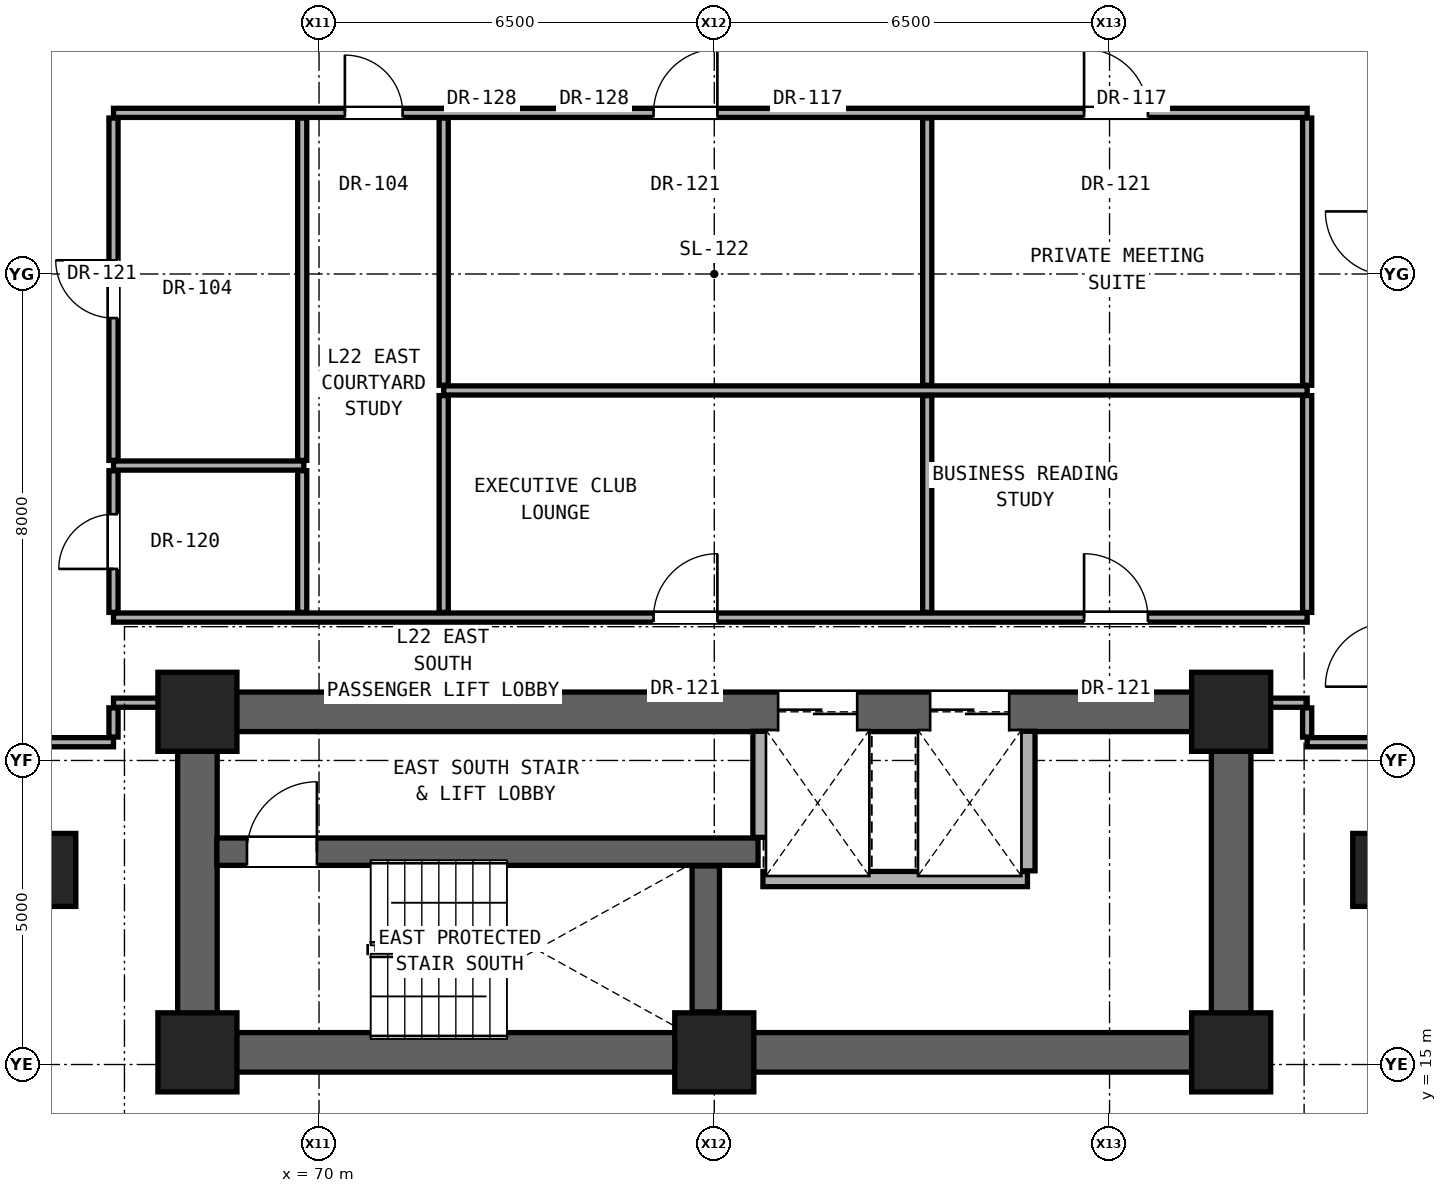
"""IFC4 building model, lengths in metres.
Left out: names, types, materials, properties, quantities, classifications, styles, units other than length and angle.
Written with IfcOpenShell. Run it as: python <this file> out.ifc"""

import sys

from ifc_helpers import new_model, si_unit, direction, frame, frame_2d, origin, origin_2d, place, context, subcontext, project, spatial, rectangle, extrude, element, fill, save


model = new_model("IFC4")
c1 = context("Model", 3, precision=1e-05, world=origin(), true_north=direction((0.0, 1.0)))
c2 = subcontext(c1, "Body", "Model", "MODEL_VIEW")
j1 = project(units=[si_unit("LENGTHUNIT", "METRE"), si_unit("PLANEANGLEUNIT", "RADIAN")], contexts=[c1])
p1 = place(None, origin())
s1 = spatial("IfcSite", under=j1, at=p1, CompositionType="ELEMENT")
p2 = place(p1, origin())
s2 = spatial("IfcBuilding", under=s1, at=p2, CompositionType="ELEMENT")
p3 = place(p2, frame((0.0, 0.0, 78.5)))
s3 = spatial("IfcBuildingStorey", under=s2, at=p3, CompositionType="ELEMENT", Elevation=78.5)
for number, where, z_axis, x_axis in (
    (1, (68.0, 15.2, 0.0), (0.0, 0.0, 1.0), (1.0, 0.0, 0.0)),
    (2, (76.5, 15.2, 0.0), (0.0, 0.0, 1.0), (1.0, 0.0, 0.0)),
    (3, (85.0, 15.2, 0.0), (0.0, 0.0, 1.0), (1.0, 0.0, 0.0)),
    (4, (68.0, 20.8, 0.0), (0.0, 0.0, 1.0), (1.0, 0.0, 0.0)),
    (5, (85.0, 20.8, 0.0), (0.0, 0.0, 1.0), (1.0, 0.0, 0.0)),
):
    element("IfcColumn", number, at=place(p3, frame(where, z_axis=z_axis, x_axis=x_axis)), inside=s3, PredefinedType="COLUMN", context=c2, shape_type="SweptSolid", body=[
        extrude(rectangle(XDim=1.3, YDim=1.3, at=origin_2d()), origin(), (0.0, 0.0, 1.0), 3.3),
    ])
for number, where, z_axis, x_axis in (
    (6, (65.6, 18.2, 0.0), (0.0, 0.0, 1.0), (1.0, 0.0, 0.0)),
    (7, (87.4, 18.2, 0.0), (0.0, 0.0, 1.0), (1.0, 0.0, 0.0)),
):
    element("IfcColumn", number, at=place(p3, frame(where, z_axis=z_axis, x_axis=x_axis)), inside=s3, PredefinedType="PILASTER", context=c2, shape_type="SweptSolid", body=[
        extrude(rectangle(XDim=0.8, YDim=1.2, at=origin_2d()), origin(), (0.0, 0.0, 1.0), 3.3),
    ])
p4 = place(p3, frame((68.0, 15.2, 0.0), z_axis=(0.0, 0.0, 1.0), x_axis=(1.0, 0.0, 0.0)))
e8 = element("IfcWall", 8, at=p4, inside=s3, PredefinedType="SHEAR", context=c2, shape_type="SweptSolid", body=[
    extrude(rectangle(XDim=17.0, YDim=0.65, at=frame_2d((8.5, 0.0))), origin(), (0.0, 0.0, 1.0), 2.94),
])
for number, where, z_axis, x_axis in (
    (9, (68.0, 15.2, 0.0), (0.0, 0.0, 1.0), (0.0, 1.0, 0.0)),
    (10, (85.0, 15.2, 0.0), (0.0, 0.0, 1.0), (0.0, 1.0, 0.0)),
):
    element("IfcWall", number, at=place(p3, frame(where, z_axis=z_axis, x_axis=x_axis)), inside=s3, PredefinedType="SHEAR", context=c2, shape_type="SweptSolid", body=[
        extrude(rectangle(XDim=5.6, YDim=0.65, at=frame_2d((2.8, 0.0))), origin(), (0.0, 0.0, 1.0), 2.94),
    ])
p5 = place(p3, frame((68.0, 20.8, 0.0), z_axis=(0.0, 0.0, 1.0), x_axis=(1.0, 0.0, 0.0)))
e11 = element("IfcWall", 11, at=p5, inside=s3, PredefinedType="SHEAR", context=c2, shape_type="SweptSolid", body=[
    extrude(rectangle(XDim=17.0, YDim=0.65, at=frame_2d((8.5, 0.0))), origin(), (0.0, 0.0, 1.0), 2.94),
])
p6 = place(p5, frame((9.55, 0.0, 0.0)))
e12 = element("IfcOpeningElement", 12, at=p6, cuts=e11, PredefinedType="OPENING", context=c2, shape_type="SweptSolid", body=[
    extrude(rectangle(XDim=1.3, YDim=2.3, at=frame_2d((0.65, 1.15))), frame((0.0, 0.335, 0.0), z_axis=(0.0, -1.0, 0.0), x_axis=(1.0, 0.0, 0.0)), (0.0, 0.0, 1.0), 0.67),
])
p7 = place(p5, frame((12.05, 0.0, 0.0)))
e13 = element("IfcOpeningElement", 13, at=p7, cuts=e11, PredefinedType="OPENING", context=c2, shape_type="SweptSolid", body=[
    extrude(rectangle(XDim=1.3, YDim=2.3, at=frame_2d((0.65, 1.15))), frame((0.0, 0.335, 0.0), z_axis=(0.0, -1.0, 0.0), x_axis=(1.0, 0.0, 0.0)), (0.0, 0.0, 1.0), 0.67),
])
p8 = place(p3, frame((77.3, 18.05, 0.0), z_axis=(0.0, 0.0, 1.0), x_axis=(1.0, 0.0, 0.0)))
e14 = element("IfcWall", 14, at=p8, inside=s3, PredefinedType="SOLIDWALL", context=c2, shape_type="SweptSolid", body=[
    extrude(rectangle(XDim=4.35, YDim=0.25, at=frame_2d((2.175, 0.0))), origin(), (0.0, 0.0, 1.0), 2.94),
])
p9 = place(p3, frame((68.32, 18.5, 0.0), z_axis=(0.0, 0.0, 1.0), x_axis=(1.0, 0.0, 0.0)))
e15 = element("IfcWall", 15, at=p9, inside=s3, PredefinedType="SHEAR", context=c2, shape_type="SweptSolid", body=[
    extrude(rectangle(XDim=8.9, YDim=0.45, at=frame_2d((4.45, 0.0))), origin(), (0.0, 0.0, 1.0), 2.94),
])
p10 = place(p9, frame((0.495, 0.0, 0.0)))
e16 = element("IfcOpeningElement", 16, at=p10, cuts=e15, PredefinedType="OPENING", context=c2, shape_type="SweptSolid", body=[
    extrude(rectangle(XDim=1.15, YDim=2.2, at=frame_2d((0.575, 1.1))), frame((0.0, 0.235, 0.0), z_axis=(0.0, -1.0, 0.0), x_axis=(1.0, 0.0, 0.0)), (0.0, 0.0, 1.0), 0.47),
])
p11 = place(p3, frame((65.25, 20.3, 0.0), z_axis=(0.0, 0.0, 1.0), x_axis=(1.0, 0.0, 0.0)))
e17 = element("IfcWall", 17, at=p11, inside=s3, PredefinedType="PARTITIONING", context=c2, shape_type="SweptSolid", body=[
    extrude(rectangle(XDim=1.37, YDim=0.15, at=frame_2d((0.685, 0.0))), origin(), (0.0, 0.0, 1.0), 2.94),
])
p12 = place(p3, frame((86.25, 20.3, 0.0), z_axis=(0.0, 0.0, 1.0), x_axis=(1.0, 0.0, 0.0)))
e18 = element("IfcWall", 18, at=p12, inside=s3, PredefinedType="PARTITIONING", context=c2, shape_type="SweptSolid", body=[
    extrude(rectangle(XDim=1.35, YDim=0.15, at=frame_2d((0.675, 0.0))), origin(), (0.0, 0.0, 1.0), 2.94),
])
p13 = place(p3, frame((66.62, 20.95, 0.0), z_axis=(0.0, 0.0, 1.0), x_axis=(1.0, 0.0, 0.0)))
e19 = element("IfcWall", 19, at=p13, inside=s3, PredefinedType="PARTITIONING", context=c2, shape_type="SweptSolid", body=[
    extrude(rectangle(XDim=1.06, YDim=0.15, at=frame_2d((0.53, 0.0))), origin(), (0.0, 0.0, 1.0), 2.332),
])
p14 = place(p3, frame((85.32, 20.95, 0.0), z_axis=(0.0, 0.0, 1.0), x_axis=(1.0, 0.0, 0.0)))
e20 = element("IfcWall", 20, at=p14, inside=s3, PredefinedType="PARTITIONING", context=c2, shape_type="SweptSolid", body=[
    extrude(rectangle(XDim=0.93, YDim=0.15, at=frame_2d((0.465, 0.0))), origin(), (0.0, 0.0, 1.0), 2.332),
])
p15 = place(p3, frame((66.62, 22.35, 0.0), z_axis=(0.0, 0.0, 1.0), x_axis=(1.0, 0.0, 0.0)))
e21 = element("IfcWall", 21, at=p15, inside=s3, PredefinedType="PARTITIONING", context=c2, shape_type="SweptSolid", body=[
    extrude(rectangle(XDim=19.63, YDim=0.15, at=frame_2d((9.815, 0.0))), origin(), (0.0, 0.0, 1.0), 2.316),
])
p16 = place(p15, frame((8.881, 0.0, 0.0)))
e22 = element("IfcOpeningElement", 22, at=p16, cuts=e21, PredefinedType="OPENING", context=c2, shape_type="SweptSolid", body=[
    extrude(rectangle(XDim=1.05, YDim=2.2, at=frame_2d((0.525, 1.1))), frame((0.0, 0.085, 0.0), z_axis=(0.0, -1.0, 0.0), x_axis=(1.0, 0.0, 0.0)), (0.0, 0.0, 1.0), 0.17),
])
p17 = place(p15, frame((15.961, 0.0, 0.0)))
e23 = element("IfcOpeningElement", 23, at=p17, cuts=e21, PredefinedType="OPENING", context=c2, shape_type="SweptSolid", body=[
    extrude(rectangle(XDim=1.05, YDim=2.2, at=frame_2d((0.525, 1.1))), frame((0.0, 0.085, 0.0), z_axis=(0.0, -1.0, 0.0), x_axis=(1.0, 0.0, 0.0)), (0.0, 0.0, 1.0), 0.17),
])
p18 = place(p3, frame((66.62, 24.85, 0.0), z_axis=(0.0, 0.0, 1.0), x_axis=(1.0, 0.0, 0.0)))
e24 = element("IfcWall", 24, at=p18, inside=s3, PredefinedType="PARTITIONING", context=c2, shape_type="SweptSolid", body=[
    extrude(rectangle(XDim=3.13, YDim=0.15, at=frame_2d((1.565, 0.0))), origin(), (0.0, 0.0, 1.0), 2.316),
])
p19 = place(p3, frame((72.05, 26.085, 0.0), z_axis=(0.0, 0.0, 1.0), x_axis=(1.0, 0.0, 0.0)))
e25 = element("IfcWall", 25, at=p19, inside=s3, PredefinedType="PARTITIONING", context=c2, shape_type="SweptSolid", body=[
    extrude(rectangle(XDim=14.2, YDim=0.15, at=frame_2d((7.1, 0.0))), origin(), (0.0, 0.0, 1.0), 2.316),
])
p20 = place(p3, frame((66.62, 30.65, 0.0), z_axis=(0.0, 0.0, 1.0), x_axis=(1.0, 0.0, 0.0)))
e26 = element("IfcWall", 26, at=p20, inside=s3, PredefinedType="PARTITIONING", context=c2, shape_type="SweptSolid", body=[
    extrude(rectangle(XDim=19.63, YDim=0.15, at=frame_2d((9.815, 0.0))), origin(), (0.0, 0.0, 1.0), 2.316),
])
p21 = place(p20, frame((3.805, 0.0, 0.0)))
e27 = element("IfcOpeningElement", 27, at=p21, cuts=e26, PredefinedType="OPENING", context=c2, shape_type="SweptSolid", body=[
    extrude(rectangle(XDim=0.95, YDim=2.15, at=frame_2d((0.475, 1.075))), frame((0.0, 0.085, 0.0), z_axis=(0.0, -1.0, 0.0), x_axis=(1.0, 0.0, 0.0)), (0.0, 0.0, 1.0), 0.17),
])
p22 = place(p20, frame((8.881, 0.0, 0.0)))
e28 = element("IfcOpeningElement", 28, at=p22, cuts=e26, PredefinedType="OPENING", context=c2, shape_type="SweptSolid", body=[
    extrude(rectangle(XDim=1.05, YDim=2.2, at=frame_2d((0.525, 1.1))), frame((0.0, 0.085, 0.0), z_axis=(0.0, -1.0, 0.0), x_axis=(1.0, 0.0, 0.0)), (0.0, 0.0, 1.0), 0.17),
])
p23 = place(p20, frame((15.961, 0.0, 0.0)))
e29 = element("IfcOpeningElement", 29, at=p23, cuts=e26, PredefinedType="OPENING", context=c2, shape_type="SweptSolid", body=[
    extrude(rectangle(XDim=1.05, YDim=2.2, at=frame_2d((0.525, 1.1))), frame((0.0, 0.085, 0.0), z_axis=(0.0, -1.0, 0.0), x_axis=(1.0, 0.0, 0.0)), (0.0, 0.0, 1.0), 0.17),
])
p24 = place(p3, frame((66.62, 20.385, 0.0), z_axis=(0.0, 0.0, 1.0), x_axis=(0.0, 1.0, 0.0)))
e30 = element("IfcWall", 30, at=p24, inside=s3, PredefinedType="PARTITIONING", context=c2, shape_type="SweptSolid", body=[
    extrude(rectangle(XDim=0.48, YDim=0.15, at=frame_2d((0.24, 0.0))), origin(), (0.0, 0.0, 1.0), 2.332),
])
p25 = place(p3, frame((66.62, 22.435, 0.0), z_axis=(0.0, 0.0, 1.0), x_axis=(0.0, 1.0, 0.0)))
e31 = element("IfcWall", 31, at=p25, inside=s3, PredefinedType="PARTITIONING", context=c2, shape_type="SweptSolid", body=[
    extrude(rectangle(XDim=2.33, YDim=0.15, at=frame_2d((1.165, 0.0))), origin(), (0.0, 0.0, 1.0), 2.94),
])
p26 = place(p25, frame((0.715, 0.0, 0.0)))
e32 = element("IfcOpeningElement", 32, at=p26, cuts=e31, PredefinedType="OPENING", context=c2, shape_type="SweptSolid", body=[
    extrude(rectangle(XDim=0.9, YDim=2.1, at=frame_2d((0.45, 1.05))), frame((0.0, 0.085, 0.0), z_axis=(0.0, -1.0, 0.0), x_axis=(1.0, 0.0, 0.0)), (0.0, 0.0, 1.0), 0.17),
])
p27 = place(p3, frame((66.62, 24.935, 0.0), z_axis=(0.0, 0.0, 1.0), x_axis=(0.0, 1.0, 0.0)))
e33 = element("IfcWall", 33, at=p27, inside=s3, PredefinedType="PARTITIONING", context=c2, shape_type="SweptSolid", body=[
    extrude(rectangle(XDim=5.63, YDim=0.15, at=frame_2d((2.815, 0.0))), origin(), (0.0, 0.0, 1.0), 2.316),
])
p28 = place(p27, frame((2.34, 0.0, 0.0)))
e34 = element("IfcOpeningElement", 34, at=p28, cuts=e33, PredefinedType="OPENING", context=c2, shape_type="SweptSolid", body=[
    extrude(rectangle(XDim=0.95, YDim=2.15, at=frame_2d((0.475, 1.075))), frame((0.0, 0.085, 0.0), z_axis=(0.0, -1.0, 0.0), x_axis=(1.0, 0.0, 0.0)), (0.0, 0.0, 1.0), 0.17),
])
p29 = place(p3, frame((69.723, 22.435, 0.0), z_axis=(0.0, 0.0, 1.0), x_axis=(0.0, 1.0, 0.0)))
e35 = element("IfcWall", 35, at=p29, inside=s3, PredefinedType="PARTITIONING", context=c2, shape_type="SweptSolid", body=[
    extrude(rectangle(XDim=2.33, YDim=0.15, at=frame_2d((1.165, 0.0))), origin(), (0.0, 0.0, 1.0), 2.94),
])
p30 = place(p3, frame((69.723, 24.935, 0.0), z_axis=(0.0, 0.0, 1.0), x_axis=(0.0, 1.0, 0.0)))
e36 = element("IfcWall", 36, at=p30, inside=s3, PredefinedType="PARTITIONING", context=c2, shape_type="SweptSolid", body=[
    extrude(rectangle(XDim=5.63, YDim=0.15, at=frame_2d((2.815, 0.0))), origin(), (0.0, 0.0, 1.0), 2.316),
])
p31 = place(p3, frame((72.05, 22.435, 0.0), z_axis=(0.0, 0.0, 1.0), x_axis=(0.0, 1.0, 0.0)))
e37 = element("IfcWall", 37, at=p31, inside=s3, PredefinedType="PARTITIONING", context=c2, shape_type="SweptSolid", body=[
    extrude(rectangle(XDim=3.565, YDim=0.15, at=frame_2d((1.782, 0.0))), origin(), (0.0, 0.0, 1.0), 2.469),
])
p32 = place(p3, frame((72.05, 26.17, 0.0), z_axis=(0.0, 0.0, 1.0), x_axis=(0.0, 1.0, 0.0)))
e38 = element("IfcWall", 38, at=p32, inside=s3, PredefinedType="PARTITIONING", context=c2, shape_type="SweptSolid", body=[
    extrude(rectangle(XDim=4.395, YDim=0.15, at=frame_2d((2.198, 0.0))), origin(), (0.0, 0.0, 1.0), 2.316),
])
p33 = place(p3, frame((76.36, 15.865, 0.0), z_axis=(0.0, 0.0, 1.0), x_axis=(0.0, 1.0, 0.0)))
e39 = element("IfcWall", 39, at=p33, inside=s3, PredefinedType="SHEAR", context=c2, shape_type="SweptSolid", body=[
    extrude(rectangle(XDim=2.4, YDim=0.45, at=frame_2d((1.2, 0.0))), origin(), (0.0, 0.0, 1.0), 2.94),
])
p34 = place(p3, frame((77.26, 18.735, 0.0), z_axis=(0.0, 0.0, 1.0), x_axis=(0.0, 1.0, 0.0)))
e40 = element("IfcWall", 40, at=p34, inside=s3, PredefinedType="SOLIDWALL", context=c2, shape_type="SweptSolid", body=[
    extrude(rectangle(XDim=1.745, YDim=0.25, at=frame_2d((0.873, 0.0))), origin(), (0.0, 0.0, 1.0), 2.94),
])
p35 = place(p3, frame((80.002, 22.435, 0.0), z_axis=(0.0, 0.0, 1.0), x_axis=(0.0, 1.0, 0.0)))
e41 = element("IfcWall", 41, at=p35, inside=s3, PredefinedType="PARTITIONING", context=c2, shape_type="SweptSolid", body=[
    extrude(rectangle(XDim=3.565, YDim=0.15, at=frame_2d((1.782, 0.0))), origin(), (0.0, 0.0, 1.0), 2.94),
])
p36 = place(p3, frame((80.002, 26.17, 0.0), z_axis=(0.0, 0.0, 1.0), x_axis=(0.0, 1.0, 0.0)))
e42 = element("IfcWall", 42, at=p36, inside=s3, PredefinedType="PARTITIONING", context=c2, shape_type="SweptSolid", body=[
    extrude(rectangle(XDim=4.395, YDim=0.15, at=frame_2d((2.198, 0.0))), origin(), (0.0, 0.0, 1.0), 2.316),
])
p37 = place(p3, frame((81.65, 18.185, 0.0), z_axis=(0.0, 0.0, 1.0), x_axis=(0.0, 1.0, 0.0)))
e43 = element("IfcWall", 43, at=p37, inside=s3, PredefinedType="SOLIDWALL", context=c2, shape_type="SweptSolid", body=[
    extrude(rectangle(XDim=2.295, YDim=0.25, at=frame_2d((1.147, 0.0))), origin(), (0.0, 0.0, 1.0), 2.94),
])
p38 = place(p3, frame((86.25, 20.385, 0.0), z_axis=(0.0, 0.0, 1.0), x_axis=(0.0, 1.0, 0.0)))
e44 = element("IfcWall", 44, at=p38, inside=s3, PredefinedType="PARTITIONING", context=c2, shape_type="SweptSolid", body=[
    extrude(rectangle(XDim=0.48, YDim=0.15, at=frame_2d((0.24, 0.0))), origin(), (0.0, 0.0, 1.0), 2.332),
])
p39 = place(p3, frame((86.25, 22.435, 0.0), z_axis=(0.0, 0.0, 1.0), x_axis=(0.0, 1.0, 0.0)))
e45 = element("IfcWall", 45, at=p39, inside=s3, PredefinedType="PARTITIONING", context=c2, shape_type="SweptSolid", body=[
    extrude(rectangle(XDim=3.565, YDim=0.15, at=frame_2d((1.782, 0.0))), origin(), (0.0, 0.0, 1.0), 2.94),
])
p40 = place(p3, frame((86.25, 26.17, 0.0), z_axis=(0.0, 0.0, 1.0), x_axis=(0.0, 1.0, 0.0)))
e46 = element("IfcWall", 46, at=p40, inside=s3, PredefinedType="PARTITIONING", context=c2, shape_type="SweptSolid", body=[
    extrude(rectangle(XDim=4.395, YDim=0.15, at=frame_2d((2.198, 0.0))), origin(), (0.0, 0.0, 1.0), 2.316),
])
p41 = place(p10, origin())
e47 = element("IfcDoor", 47, at=p41, inside=s3, OperationType="SINGLE_SWING_RIGHT", PredefinedType="DOOR", context=c2, shape_type="SweptSolid", body=[
    extrude(rectangle(XDim=1.15, YDim=2.2, at=frame_2d((0.575, 1.1))), frame((0.0, 0.025, 0.0), z_axis=(0.0, -1.0, 0.0), x_axis=(1.0, 0.0, 0.0)), (0.0, 0.0, 1.0), 0.05),
])
fill(e16, e47)
p42 = place(p26, origin())
e48 = element("IfcDoor", 48, at=p42, inside=s3, OperationType="SINGLE_SWING_LEFT", PredefinedType="DOOR", context=c2, shape_type="SweptSolid", body=[
    extrude(rectangle(XDim=0.9, YDim=2.1, at=frame_2d((0.45, 1.05))), frame((0.0, 0.025, 0.0), z_axis=(0.0, -1.0, 0.0), x_axis=(1.0, 0.0, 0.0)), (0.0, 0.0, 1.0), 0.05),
])
fill(e32, e48)
p43 = place(p28, origin())
e49 = element("IfcDoor", 49, at=p43, inside=s3, OperationType="SINGLE_SWING_RIGHT", PredefinedType="DOOR", context=c2, shape_type="SweptSolid", body=[
    extrude(rectangle(XDim=0.95, YDim=2.15, at=frame_2d((0.475, 1.075))), frame((0.0, 0.025, 0.0), z_axis=(0.0, -1.0, 0.0), x_axis=(1.0, 0.0, 0.0)), (0.0, 0.0, 1.0), 0.05),
])
fill(e34, e49)
p44 = place(p21, origin())
e50 = element("IfcDoor", 50, at=p44, inside=s3, OperationType="SINGLE_SWING_LEFT", PredefinedType="DOOR", context=c2, shape_type="SweptSolid", body=[
    extrude(rectangle(XDim=0.95, YDim=2.15, at=frame_2d((0.475, 1.075))), frame((0.0, 0.025, 0.0), z_axis=(0.0, -1.0, 0.0), x_axis=(1.0, 0.0, 0.0)), (0.0, 0.0, 1.0), 0.05),
])
fill(e27, e50)
p45 = place(p16, origin())
e51 = element("IfcDoor", 51, at=p45, inside=s3, OperationType="SINGLE_SWING_RIGHT", PredefinedType="DOOR", context=c2, shape_type="SweptSolid", body=[
    extrude(rectangle(XDim=1.05, YDim=2.2, at=frame_2d((0.525, 1.1))), frame((0.0, 0.025, 0.0), z_axis=(0.0, -1.0, 0.0), x_axis=(1.0, 0.0, 0.0)), (0.0, 0.0, 1.0), 0.05),
])
fill(e22, e51)
p46 = place(p17, origin())
e52 = element("IfcDoor", 52, at=p46, inside=s3, OperationType="SINGLE_SWING_LEFT", PredefinedType="DOOR", context=c2, shape_type="SweptSolid", body=[
    extrude(rectangle(XDim=1.05, YDim=2.2, at=frame_2d((0.525, 1.1))), frame((0.0, 0.025, 0.0), z_axis=(0.0, -1.0, 0.0), x_axis=(1.0, 0.0, 0.0)), (0.0, 0.0, 1.0), 0.05),
])
fill(e23, e52)
p47 = place(p22, origin())
e53 = element("IfcDoor", 53, at=p47, inside=s3, OperationType="SINGLE_SWING_RIGHT", PredefinedType="DOOR", context=c2, shape_type="SweptSolid", body=[
    extrude(rectangle(XDim=1.05, YDim=2.2, at=frame_2d((0.525, 1.1))), frame((0.0, 0.025, 0.0), z_axis=(0.0, -1.0, 0.0), x_axis=(1.0, 0.0, 0.0)), (0.0, 0.0, 1.0), 0.05),
])
fill(e28, e53)
p48 = place(p23, origin())
e54 = element("IfcDoor", 54, at=p48, inside=s3, OperationType="SINGLE_SWING_LEFT", PredefinedType="DOOR", context=c2, shape_type="SweptSolid", body=[
    extrude(rectangle(XDim=1.05, YDim=2.2, at=frame_2d((0.525, 1.1))), frame((0.0, 0.025, 0.0), z_axis=(0.0, -1.0, 0.0), x_axis=(1.0, 0.0, 0.0)), (0.0, 0.0, 1.0), 0.05),
])
fill(e29, e54)
p49 = place(p6, origin())
e55 = element("IfcDoor", 55, at=p49, inside=s3, OperationType="DOUBLE_DOOR_SLIDING", PredefinedType="DOOR", context=c2, shape_type="SweptSolid", body=[
    extrude(rectangle(XDim=1.3, YDim=2.3, at=frame_2d((0.65, 1.15))), frame((0.0, 0.025, 0.0), z_axis=(0.0, -1.0, 0.0), x_axis=(1.0, 0.0, 0.0)), (0.0, 0.0, 1.0), 0.05),
])
fill(e12, e55)
p50 = place(p7, origin())
e56 = element("IfcDoor", 56, at=p50, inside=s3, OperationType="DOUBLE_DOOR_SLIDING", PredefinedType="DOOR", context=c2, shape_type="SweptSolid", body=[
    extrude(rectangle(XDim=1.3, YDim=2.3, at=frame_2d((0.65, 1.15))), frame((0.0, 0.025, 0.0), z_axis=(0.0, -1.0, 0.0), x_axis=(1.0, 0.0, 0.0)), (0.0, 0.0, 1.0), 0.05),
])
fill(e13, e56)
save(model, sys.argv[1])
